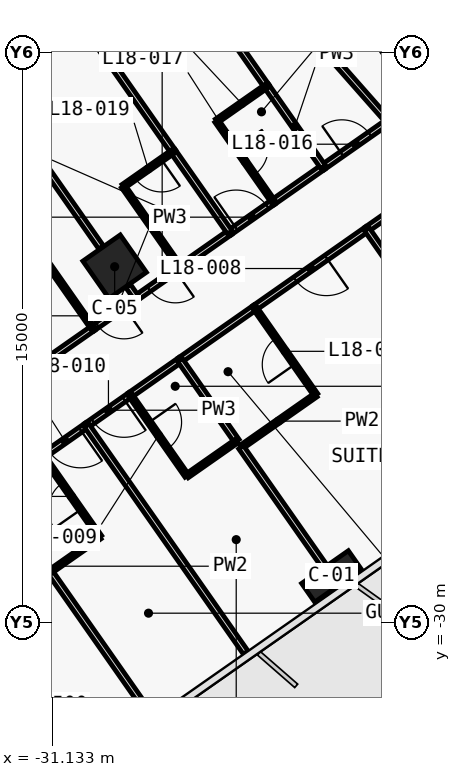
"""IFC4 building model, lengths in metres.
Left out: names, types, materials, properties, quantities, classifications, styles, units other than length and angle.
Written with IfcOpenShell. Run it as: python <this file> out.ifc"""

import sys

from ifc_helpers import new_model, si_unit, direction, frame, frame_2d, origin, origin_2d, place, context, subcontext, project, spatial, polyline, rectangle, outline, extrude, element, fill, save


model = new_model("IFC4")
c1 = context("Model", 3, precision=1e-05, world=origin(), true_north=direction((0.0, 1.0)))
c2 = subcontext(c1, "Body", "Model", "MODEL_VIEW")
j1 = project(units=[si_unit("LENGTHUNIT", "METRE"), si_unit("PLANEANGLEUNIT", "RADIAN")], contexts=[c1])
p1 = place(None, origin())
s1 = spatial("IfcSite", under=j1, at=p1, CompositionType="ELEMENT")
p2 = place(p1, origin())
s2 = spatial("IfcBuilding", under=s1, at=p2, CompositionType="ELEMENT")
p3 = place(p2, frame((0.0, 0.0, 90.5)))
s3 = spatial("IfcBuildingStorey", under=s2, at=p3, CompositionType="ELEMENT", Elevation=90.5)
p4 = place(p3, frame((-21.708, -15.2, 0.0), z_axis=(0.0, 0.0, 1.0), x_axis=(-0.573576324356, 0.819152122709, 0.0)))
e1 = element("IfcWall", 1, at=p4, inside=s3, PredefinedType="SHEAR", context=c2, shape_type="SweptSolid", body=[
    extrude(outline(polyline([(0.0, 0.5), (0.0, -0.5), (9.2, -0.5), (9.2, 0.5), (0.0, 0.5)])), origin(), (0.0, 0.0, 1.0), 3.6),
])
p5 = place(p4, frame((6.1, 0.0, 0.0)))
e2 = element("IfcOpeningElement", 2, at=p5, cuts=e1, PredefinedType="OPENING", context=c2, shape_type="SweptSolid", body=[
    extrude(rectangle(XDim=1.8, YDim=2.1, at=frame_2d((0.9, 1.05))), frame((0.0, 0.51, 0.0), z_axis=(0.0, -1.0, 0.0), x_axis=(1.0, 0.0, 0.0)), (0.0, 0.0, 1.0), 1.02),
])
p6 = place(p4, frame((1.9, 0.0, 0.0)))
e3 = element("IfcOpeningElement", 3, at=p6, cuts=e1, PredefinedType="OPENING", context=c2, shape_type="SweptSolid", body=[
    extrude(rectangle(XDim=1.8, YDim=2.1, at=frame_2d((0.9, 1.05))), frame((0.0, 0.51, 0.0), z_axis=(0.0, -1.0, 0.0), x_axis=(1.0, 0.0, 0.0)), (0.0, 0.0, 1.0), 1.02),
])
p7 = place(p3, frame((-23.782, -28.799, 0.0), z_axis=(0.0, 0.0, 1.0), x_axis=(-0.819152044289, -0.573576436351, 0.0)))
e4 = element("IfcColumn", 4, at=p7, inside=s3, PredefinedType="COLUMN", context=c2, shape_type="SweptSolid", body=[
    extrude(rectangle(XDim=1.5, YDim=0.6, at=origin_2d()), origin(), (0.0, 0.0, 1.0), 3.6),
])
p8 = place(p3, frame((-29.49, -20.649, 0.0), z_axis=(0.0, 0.0, 1.0), x_axis=(-0.819152044289, -0.573576436351, 0.0)))
e5 = element("IfcColumn", 5, at=p8, inside=s3, PredefinedType="COLUMN", context=c2, shape_type="SweptSolid", body=[
    extrude(rectangle(XDim=1.2, YDim=1.2, at=origin_2d()), origin(), (0.0, 0.0, 1.0), 3.6),
])
p9 = place(p3, frame((-24.003, -18.028, 0.0), z_axis=(0.0, 0.0, 1.0), x_axis=(0.819160859995, 0.573563846013, 0.0)))
e6 = element("IfcWall", 6, at=p9, inside=s3, PredefinedType="PARTITIONING", context=c2, shape_type="SweptSolid", body=[
    extrude(rectangle(XDim=2.098, YDim=0.15, at=frame_2d((1.049, 0.0))), origin(), (0.0, 0.0, 1.0), 3.32),
])
p10 = place(p9, frame((0.599, 0.0, 0.0)))
e7 = element("IfcOpeningElement", 7, at=p10, cuts=e6, PredefinedType="OPENING", context=c2, shape_type="SweptSolid", body=[
    extrude(rectangle(XDim=0.9, YDim=2.1, at=frame_2d((0.45, 1.05))), frame((0.0, 0.085, 0.0), z_axis=(0.0, -1.0, 0.0), x_axis=(1.0, 0.0, 0.0)), (0.0, 0.0, 1.0), 0.17),
])
p11 = place(p3, frame((-26.46, -19.748, 0.0), z_axis=(0.0, 0.0, 1.0), x_axis=(0.819199220913, 0.573509055252, 0.0)))
e8 = element("IfcWall", 8, at=p11, inside=s3, PredefinedType="PARTITIONING", context=c2, shape_type="SweptSolid", body=[
    extrude(rectangle(XDim=1.403, YDim=0.15, at=frame_2d((0.702, 0.0))), origin(), (0.0, 0.0, 1.0), 3.32),
])
p12 = place(p11, frame((0.202, 0.0, 0.0)))
e9 = element("IfcOpeningElement", 9, at=p12, cuts=e8, PredefinedType="OPENING", context=c2, shape_type="SweptSolid", body=[
    extrude(rectangle(XDim=1.0, YDim=2.1, at=frame_2d((0.5, 1.05))), frame((0.0, 0.085, 0.0), z_axis=(0.0, -1.0, 0.0), x_axis=(1.0, 0.0, 0.0)), (0.0, 0.0, 1.0), 0.17),
])
p13 = place(p3, frame((-25.313, -18.945, 0.0), z_axis=(0.0, 0.0, 1.0), x_axis=(0.819189013667, 0.573523634986, 0.0)))
e10 = element("IfcWall", 10, at=p13, inside=s3, PredefinedType="PARTITIONING", context=c2, shape_type="SweptSolid", body=[
    extrude(rectangle(XDim=1.604, YDim=0.15, at=frame_2d((0.802, 0.0))), origin(), (0.0, 0.0, 1.0), 3.32),
])
p14 = place(p3, frame((-27.768, -20.664, 0.0), z_axis=(0.0, 0.0, 1.0), x_axis=(-0.81914197737, -0.573590813132, 0.0)))
e11 = element("IfcWall", 11, at=p14, inside=s3, PredefinedType="PARTITIONING", context=c2, shape_type="SweptSolid", body=[
    extrude(rectangle(XDim=1.403, YDim=0.15, at=frame_2d((0.701, 0.0))), origin(), (0.0, 0.0, 1.0), 2.6),
])
p15 = place(p14, frame((0.15, 0.0, 0.0)))
e12 = element("IfcOpeningElement", 12, at=p15, cuts=e11, PredefinedType="OPENING", context=c2, shape_type="SweptSolid", body=[
    extrude(rectangle(XDim=0.85, YDim=2.1, at=frame_2d((0.425, 1.05))), frame((0.0, 0.085, 0.0), z_axis=(0.0, -1.0, 0.0), x_axis=(1.0, 0.0, 0.0)), (0.0, 0.0, 1.0), 0.17),
])
p16 = place(p3, frame((-27.771, -20.666, 0.0), z_axis=(0.0, 0.0, 1.0), x_axis=(0.819189013667, 0.573523634986, 0.0)))
e13 = element("IfcWall", 13, at=p16, inside=s3, PredefinedType="PARTITIONING", context=c2, shape_type="SweptSolid", body=[
    extrude(rectangle(XDim=1.604, YDim=0.15, at=frame_2d((0.802, 0.0))), origin(), (0.0, 0.0, 1.0), 3.32),
])
p17 = place(p3, frame((-28.914, -21.467, 0.0), z_axis=(0.0, 0.0, 1.0), x_axis=(-0.81914197737, -0.573590813132, 0.0)))
e14 = element("IfcWall", 14, at=p17, inside=s3, PredefinedType="PARTITIONING", context=c2, shape_type="SweptSolid", body=[
    extrude(rectangle(XDim=1.403, YDim=0.15, at=frame_2d((0.701, 0.0))), origin(), (0.0, 0.0, 1.0), 2.6),
])
p18 = place(p17, frame((0.403, 0.0, 0.0)))
e15 = element("IfcOpeningElement", 15, at=p18, cuts=e14, PredefinedType="OPENING", context=c2, shape_type="SweptSolid", body=[
    extrude(rectangle(XDim=0.85, YDim=2.1, at=frame_2d((0.425, 1.05))), frame((0.0, 0.085, 0.0), z_axis=(0.0, -1.0, 0.0), x_axis=(1.0, 0.0, 0.0)), (0.0, 0.0, 1.0), 0.17),
])
p19 = place(p3, frame((-31.375, -23.19, 0.0), z_axis=(0.0, 0.0, 1.0), x_axis=(0.819189013667, 0.573523634986, 0.0)))
e16 = element("IfcWall", 16, at=p19, inside=s3, PredefinedType="PARTITIONING", context=c2, shape_type="SweptSolid", body=[
    extrude(rectangle(XDim=1.604, YDim=0.15, at=frame_2d((0.802, 0.0))), origin(), (0.0, 0.0, 1.0), 3.32),
])
p20 = place(p3, frame((-20.395, -17.943, 0.0), z_axis=(0.0, 0.0, 1.0), x_axis=(-0.819128818764, -0.573609604409, 0.0)))
e17 = element("IfcWall", 17, at=p20, inside=s3, PredefinedType="PARTITIONING", context=c2, shape_type="SweptSolid", body=[
    extrude(rectangle(XDim=3.004, YDim=0.15, at=frame_2d((1.502, 0.0))), origin(), (0.0, 0.0, 1.0), 2.6),
])
p21 = place(p20, frame((1.052, 0.0, 0.0)))
e18 = element("IfcOpeningElement", 18, at=p21, cuts=e17, PredefinedType="OPENING", context=c2, shape_type="SweptSolid", body=[
    extrude(rectangle(XDim=0.9, YDim=2.1, at=frame_2d((0.45, 1.05))), frame((0.0, 0.085, 0.0), z_axis=(0.0, -1.0, 0.0), x_axis=(1.0, 0.0, 0.0)), (0.0, 0.0, 1.0), 0.17),
])
p22 = place(p3, frame((-22.852, -19.664, 0.0), z_axis=(0.0, 0.0, 1.0), x_axis=(-0.819145961204, -0.573585123798, 0.0)))
e19 = element("IfcWall", 19, at=p22, inside=s3, PredefinedType="PARTITIONING", context=c2, shape_type="SweptSolid", body=[
    extrude(rectangle(XDim=3.603, YDim=0.15, at=frame_2d((1.802, 0.0))), origin(), (0.0, 0.0, 1.0), 3.32),
])
p23 = place(p22, frame((1.302, 0.0, 0.0)))
e20 = element("IfcOpeningElement", 20, at=p23, cuts=e19, PredefinedType="OPENING", context=c2, shape_type="SweptSolid", body=[
    extrude(rectangle(XDim=1.0, YDim=2.1, at=frame_2d((0.5, 1.05))), frame((0.0, 0.085, 0.0), z_axis=(0.0, -1.0, 0.0), x_axis=(1.0, 0.0, 0.0)), (0.0, 0.0, 1.0), 0.17),
])
p24 = place(p3, frame((-25.801, -21.729, 0.0), z_axis=(0.0, 0.0, 1.0), x_axis=(-0.819179439794, -0.573537309527, 0.0)))
e21 = element("IfcWall", 21, at=p24, inside=s3, PredefinedType="PARTITIONING", context=c2, shape_type="SweptSolid", body=[
    extrude(rectangle(XDim=2.404, YDim=0.15, at=frame_2d((1.202, 0.0))), origin(), (0.0, 0.0, 1.0), 2.6),
])
p25 = place(p3, frame((-29.079, -24.023, 0.0), z_axis=(0.0, 0.0, 1.0), x_axis=(-0.81914197737, -0.573590813132, 0.0)))
e22 = element("IfcWall", 22, at=p25, inside=s3, PredefinedType="PARTITIONING", context=c2, shape_type="SweptSolid", body=[
    extrude(rectangle(XDim=1.403, YDim=0.15, at=frame_2d((0.701, 0.0))), origin(), (0.0, 0.0, 1.0), 3.32),
])
p26 = place(p25, frame((0.201, 0.0, 0.0)))
e23 = element("IfcOpeningElement", 23, at=p26, cuts=e22, PredefinedType="OPENING", context=c2, shape_type="SweptSolid", body=[
    extrude(rectangle(XDim=1.0, YDim=2.1, at=frame_2d((0.5, 1.05))), frame((0.0, 0.085, 0.0), z_axis=(0.0, -1.0, 0.0), x_axis=(1.0, 0.0, 0.0)), (0.0, 0.0, 1.0), 0.17),
])
p27 = place(p3, frame((-27.767, -23.105, 0.0), z_axis=(0.0, 0.0, 1.0), x_axis=(-0.819117502046, -0.573625764625, 0.0)))
e24 = element("IfcWall", 24, at=p27, inside=s3, PredefinedType="PARTITIONING", context=c2, shape_type="SweptSolid", body=[
    extrude(rectangle(XDim=1.604, YDim=0.15, at=frame_2d((0.802, 0.0))), origin(), (0.0, 0.0, 1.0), 2.6),
])
p28 = place(p3, frame((-30.225, -24.826, 0.0), z_axis=(0.0, 0.0, 1.0), x_axis=(-0.819060210533, -0.573707566205, 0.0)))
e25 = element("IfcWall", 25, at=p28, inside=s3, PredefinedType="PARTITIONING", context=c2, shape_type="SweptSolid", body=[
    extrude(rectangle(XDim=1.403, YDim=0.15, at=frame_2d((0.702, 0.0))), origin(), (0.0, 0.0, 1.0), 3.32),
])
p29 = place(p28, frame((0.202, 0.0, 0.0)))
e26 = element("IfcOpeningElement", 26, at=p29, cuts=e25, PredefinedType="OPENING", context=c2, shape_type="SweptSolid", body=[
    extrude(rectangle(XDim=1.0, YDim=2.1, at=frame_2d((0.5, 1.05))), frame((0.0, 0.085, 0.0), z_axis=(0.0, -1.0, 0.0), x_axis=(1.0, 0.0, 0.0)), (0.0, 0.0, 1.0), 0.17),
])
p30 = place(p3, frame((-22.284, -16.827, 0.0), z_axis=(0.0, 0.0, 1.0), x_axis=(-0.661545117561, 0.749905365651, 0.0)))
e27 = element("IfcWall", 27, at=p30, inside=s3, PredefinedType="PARTITIONING", context=c2, shape_type="SweptSolid", body=[
    extrude(rectangle(XDim=6.543, YDim=0.15, at=frame_2d((3.271, 0.0))), origin(), (0.0, 0.0, 1.0), 2.6),
])
p31 = place(p3, frame((-25.492, -15.897, 0.0), z_axis=(0.0, 0.0, 1.0), x_axis=(-0.573579093502, 0.819150183725, 0.0)))
e28 = element("IfcWall", 28, at=p31, inside=s3, PredefinedType="PARTITIONING", context=c2, shape_type="SweptSolid", body=[
    extrude(rectangle(XDim=8.701, YDim=0.15, at=frame_2d((4.351, 0.0))), origin(), (0.0, 0.0, 1.0), 2.6),
])
p32 = place(p3, frame((-24.001, -18.026, 0.0), z_axis=(0.0, 0.0, 1.0), x_axis=(-0.573588285102, 0.819143747577, 0.0)))
e29 = element("IfcWall", 29, at=p32, inside=s3, PredefinedType="PARTITIONING", context=c2, shape_type="SweptSolid", body=[
    extrude(rectangle(XDim=2.602, YDim=0.15, at=frame_2d((1.301, 0.0))), origin(), (0.0, 0.0, 1.0), 2.6),
])
p33 = place(p3, frame((-25.493, -15.896, 0.0), z_axis=(0.0, 0.0, 1.0), x_axis=(-0.819059844958, -0.573708088123, 0.0)))
e30 = element("IfcWall", 30, at=p33, inside=s3, PredefinedType="PARTITIONING", context=c2, shape_type="SweptSolid", body=[
    extrude(rectangle(XDim=1.6, YDim=0.12, at=frame_2d((0.8, 0.0))), origin(), (0.0, 0.0, 1.0), 3.32),
])
p34 = place(p3, frame((-26.804, -16.815, 0.0), z_axis=(0.0, 0.0, 1.0), x_axis=(0.573582085028, -0.819148089014, 0.0)))
e31 = element("IfcWall", 31, at=p34, inside=s3, PredefinedType="PARTITIONING", context=c2, shape_type="SweptSolid", body=[
    extrude(rectangle(XDim=2.6, YDim=0.12, at=frame_2d((1.3, 0.0))), origin(), (0.0, 0.0, 1.0), 2.6),
])
p35 = place(p34, frame((0.875, 0.0, 0.0)))
e32 = element("IfcOpeningElement", 32, at=p35, cuts=e31, PredefinedType="OPENING", context=c2, shape_type="SweptSolid", body=[
    extrude(rectangle(XDim=0.85, YDim=2.05, at=frame_2d((0.425, 1.025))), frame((0.0, 0.07, 0.0), z_axis=(0.0, -1.0, 0.0), x_axis=(1.0, 0.0, 0.0)), (0.0, 0.0, 1.0), 0.14),
])
p36 = place(p3, frame((-27.949, -17.618, 0.0), z_axis=(0.0, 0.0, 1.0), x_axis=(-0.573579093502, 0.819150183725, 0.0)))
e33 = element("IfcWall", 33, at=p36, inside=s3, PredefinedType="PARTITIONING", context=c2, shape_type="SweptSolid", body=[
    extrude(rectangle(XDim=8.701, YDim=0.15, at=frame_2d((4.351, 0.0))), origin(), (0.0, 0.0, 1.0), 2.6),
])
p37 = place(p3, frame((-26.458, -19.747, 0.0), z_axis=(0.0, 0.0, 1.0), x_axis=(-0.573544201094, 0.819174614714, 0.0)))
e34 = element("IfcWall", 34, at=p37, inside=s3, PredefinedType="PARTITIONING", context=c2, shape_type="SweptSolid", body=[
    extrude(rectangle(XDim=2.602, YDim=0.15, at=frame_2d((1.301, 0.0))), origin(), (0.0, 0.0, 1.0), 2.6),
])
p38 = place(p3, frame((-27.95, -17.617, 0.0), z_axis=(0.0, 0.0, 1.0), x_axis=(-0.819253425856, -0.573431621227, 0.0)))
e35 = element("IfcWall", 35, at=p38, inside=s3, PredefinedType="PARTITIONING", context=c2, shape_type="SweptSolid", body=[
    extrude(rectangle(XDim=1.6, YDim=0.12, at=frame_2d((0.8, 0.0))), origin(), (0.0, 0.0, 1.0), 3.32),
])
p39 = place(p38, frame((0.375, 0.0, 0.0)))
e36 = element("IfcOpeningElement", 36, at=p39, cuts=e35, PredefinedType="OPENING", context=c2, shape_type="SweptSolid", body=[
    extrude(rectangle(XDim=0.85, YDim=2.05, at=frame_2d((0.425, 1.025))), frame((0.0, 0.07, 0.0), z_axis=(0.0, -1.0, 0.0), x_axis=(1.0, 0.0, 0.0)), (0.0, 0.0, 1.0), 0.14),
])
p40 = place(p3, frame((-29.261, -18.536, 0.0), z_axis=(0.0, 0.0, 1.0), x_axis=(0.573537965655, -0.819178980414, 0.0)))
e37 = element("IfcWall", 37, at=p40, inside=s3, PredefinedType="PARTITIONING", context=c2, shape_type="SweptSolid", body=[
    extrude(rectangle(XDim=2.6, YDim=0.12, at=frame_2d((1.3, 0.0))), origin(), (0.0, 0.0, 1.0), 2.6),
])
p41 = place(p3, frame((-28.916, -21.468, 0.0), z_axis=(0.0, 0.0, 1.0), x_axis=(-0.572944929411, 0.819593867633, 0.0)))
e38 = element("IfcWall", 38, at=p41, inside=s3, PredefinedType="PARTITIONING", context=c2, shape_type="SweptSolid", body=[
    extrude(rectangle(XDim=0.38, YDim=0.15, at=frame_2d((0.19, 0.0))), origin(), (0.0, 0.0, 1.0), 2.6),
])
p42 = place(p3, frame((-29.845, -20.141, 0.0), z_axis=(0.0, 0.0, 1.0), x_axis=(-0.573558725113, 0.819164445546, 0.0)))
e39 = element("IfcWall", 39, at=p42, inside=s3, PredefinedType="PARTITIONING", context=c2, shape_type="SweptSolid", body=[
    extrude(rectangle(XDim=9.01, YDim=0.15, at=frame_2d((4.505, 0.0))), origin(), (0.0, 0.0, 1.0), 2.6),
])
p43 = place(p3, frame((-30.062, -22.27, 0.0), z_axis=(0.0, 0.0, 1.0), x_axis=(-0.573537965655, 0.819178980414, 0.0)))
e40 = element("IfcWall", 40, at=p43, inside=s3, PredefinedType="PARTITIONING", context=c2, shape_type="SweptSolid", body=[
    extrude(rectangle(XDim=2.6, YDim=0.12, at=frame_2d((1.3, 0.0))), origin(), (0.0, 0.0, 1.0), 2.6),
])
p44 = place(p3, frame((-18.667, -25.645, 0.0), z_axis=(0.0, 0.0, 1.0), x_axis=(-0.573572324301, 0.819154923562, 0.0)))
e41 = element("IfcWall", 41, at=p44, inside=s3, PredefinedType="PARTITIONING", context=c2, shape_type="SweptSolid", body=[
    extrude(rectangle(XDim=7.3, YDim=0.15, at=frame_2d((3.65, 0.0))), origin(), (0.0, 0.0, 1.0), 2.5),
])
p45 = place(p3, frame((-26.162, -25.401, 0.0), z_axis=(0.0, 0.0, 1.0), x_axis=(0.819155442668, 0.573571582932, 0.0)))
e42 = element("IfcWall", 42, at=p45, inside=s3, PredefinedType="PARTITIONING", context=c2, shape_type="SweptSolid", body=[
    extrude(rectangle(XDim=2.4, YDim=0.12, at=frame_2d((1.2, 0.0))), origin(), (0.0, 0.0, 1.0), 2.6),
])
p46 = place(p3, frame((-24.196, -24.023, 0.0), z_axis=(0.0, 0.0, 1.0), x_axis=(-0.573608623498, 0.819129505664, 0.0)))
e43 = element("IfcWall", 43, at=p46, inside=s3, PredefinedType="PARTITIONING", context=c2, shape_type="SweptSolid", body=[
    extrude(rectangle(XDim=2.8, YDim=0.12, at=frame_2d((1.4, 0.0))), origin(), (0.0, 0.0, 1.0), 3.32),
])
p47 = place(p46, frame((0.975, 0.0, 0.0)))
e44 = element("IfcOpeningElement", 44, at=p47, cuts=e43, PredefinedType="OPENING", context=c2, shape_type="SweptSolid", body=[
    extrude(rectangle(XDim=0.85, YDim=2.05, at=frame_2d((0.425, 1.025))), frame((0.0, 0.07, 0.0), z_axis=(0.0, -1.0, 0.0), x_axis=(1.0, 0.0, 0.0)), (0.0, 0.0, 1.0), 0.14),
])
p48 = place(p3, frame((-23.966, -28.537, 0.0), z_axis=(0.0, 0.0, 1.0), x_axis=(-0.573594994199, 0.819139049631, 0.0)))
e45 = element("IfcWall", 45, at=p48, inside=s3, PredefinedType="PARTITIONING", context=c2, shape_type="SweptSolid", body=[
    extrude(rectangle(XDim=3.829, YDim=0.15, at=frame_2d((1.915, 0.0))), origin(), (0.0, 0.0, 1.0), 2.6),
])
p49 = place(p3, frame((-26.276, -25.238, 0.0), z_axis=(0.0, 0.0, 1.0), x_axis=(-0.573588285102, 0.819143747577, 0.0)))
e46 = element("IfcWall", 46, at=p49, inside=s3, PredefinedType="PARTITIONING", context=c2, shape_type="SweptSolid", body=[
    extrude(rectangle(XDim=2.602, YDim=0.15, at=frame_2d((1.301, 0.0))), origin(), (0.0, 0.0, 1.0), 2.6),
])
p50 = place(p3, frame((-29.08, -24.024, 0.0), z_axis=(0.0, 0.0, 1.0), x_axis=(0.573537965655, -0.819178980414, 0.0)))
e47 = element("IfcWall", 47, at=p50, inside=s3, PredefinedType="PARTITIONING", context=c2, shape_type="SweptSolid", body=[
    extrude(rectangle(XDim=2.6, YDim=0.12, at=frame_2d((1.3, 0.0))), origin(), (0.0, 0.0, 1.0), 3.32),
])
p51 = place(p50, frame((0.875, 0.0, 0.0)))
e48 = element("IfcOpeningElement", 48, at=p51, cuts=e47, PredefinedType="OPENING", context=c2, shape_type="SweptSolid", body=[
    extrude(rectangle(XDim=0.85, YDim=2.05, at=frame_2d((0.425, 1.025))), frame((0.0, 0.07, 0.0), z_axis=(0.0, -1.0, 0.0), x_axis=(1.0, 0.0, 0.0)), (0.0, 0.0, 1.0), 0.14),
])
p52 = place(p3, frame((-27.587, -26.155, 0.0), z_axis=(0.0, 0.0, 1.0), x_axis=(0.819131543282, 0.57360571371, 0.0)))
e49 = element("IfcWall", 49, at=p52, inside=s3, PredefinedType="PARTITIONING", context=c2, shape_type="SweptSolid", body=[
    extrude(rectangle(XDim=1.6, YDim=0.12, at=frame_2d((0.8, 0.0))), origin(), (0.0, 0.0, 1.0), 2.6),
])
p53 = place(p3, frame((-26.039, -30.807, 0.0), z_axis=(0.0, 0.0, 1.0), x_axis=(-0.573594765376, 0.819139209862, 0.0)))
e50 = element("IfcWall", 50, at=p53, inside=s3, PredefinedType="PARTITIONING", context=c2, shape_type="SweptSolid", body=[
    extrude(rectangle(XDim=7.3, YDim=0.15, at=frame_2d((3.65, 0.0))), origin(), (0.0, 0.0, 1.0), 2.5),
])
p54 = place(p3, frame((-31.192, -28.678, 0.0), z_axis=(0.0, 0.0, 1.0), x_axis=(0.81918174131, 0.573534022273, 0.0)))
e51 = element("IfcWall", 51, at=p54, inside=s3, PredefinedType="PARTITIONING", context=c2, shape_type="SweptSolid", body=[
    extrude(rectangle(XDim=1.6, YDim=0.12, at=frame_2d((0.8, 0.0))), origin(), (0.0, 0.0, 1.0), 3.32),
])
p55 = place(p3, frame((-29.881, -27.759, 0.0), z_axis=(0.0, 0.0, 1.0), x_axis=(-0.573600972199, 0.819134863556, 0.0)))
e52 = element("IfcWall", 52, at=p55, inside=s3, PredefinedType="PARTITIONING", context=c2, shape_type="SweptSolid", body=[
    extrude(rectangle(XDim=2.6, YDim=0.12, at=frame_2d((1.3, 0.0))), origin(), (0.0, 0.0, 1.0), 3.32),
])
p56 = place(p55, frame((0.875, 0.0, 0.0)))
e53 = element("IfcOpeningElement", 53, at=p56, cuts=e52, PredefinedType="OPENING", context=c2, shape_type="SweptSolid", body=[
    extrude(rectangle(XDim=0.85, YDim=2.05, at=frame_2d((0.425, 1.025))), frame((0.0, 0.07, 0.0), z_axis=(0.0, -1.0, 0.0), x_axis=(1.0, 0.0, 0.0)), (0.0, 0.0, 1.0), 0.14),
])
p57 = place(p3, frame((-28.497, -32.528, 0.0), z_axis=(0.0, 0.0, 1.0), x_axis=(-0.573570431261, 0.819156249066, 0.0)))
e54 = element("IfcWall", 54, at=p57, inside=s3, PredefinedType="PARTITIONING", context=c2, shape_type="SweptSolid", body=[
    extrude(rectangle(XDim=4.699, YDim=0.15, at=frame_2d((2.35, 0.0))), origin(), (0.0, 0.0, 1.0), 2.5),
])
p58 = place(p47, origin())
e55 = element("IfcDoor", 55, at=p58, inside=s3, OperationType="SINGLE_SWING_LEFT", PredefinedType="DOOR", context=c2, shape_type="SweptSolid", body=[
    extrude(rectangle(XDim=0.85, YDim=2.05, at=frame_2d((0.425, 1.025))), frame((0.0, 0.025, 0.0), z_axis=(0.0, -1.0, 0.0), x_axis=(1.0, 0.0, 0.0)), (0.0, 0.0, 1.0), 0.05),
])
fill(e44, e55)
p59 = place(p23, origin())
e56 = element("IfcDoor", 56, at=p59, inside=s3, OperationType="SINGLE_SWING_RIGHT", PredefinedType="DOOR", context=c2, shape_type="SweptSolid", body=[
    extrude(rectangle(XDim=1.0, YDim=2.1, at=frame_2d((0.5, 1.05))), frame((0.0, 0.025, 0.0), z_axis=(0.0, -1.0, 0.0), x_axis=(1.0, 0.0, 0.0)), (0.0, 0.0, 1.0), 0.05),
])
fill(e20, e56)
p60 = place(p51, origin())
e57 = element("IfcDoor", 57, at=p60, inside=s3, OperationType="SINGLE_SWING_RIGHT", PredefinedType="DOOR", context=c2, shape_type="SweptSolid", body=[
    extrude(rectangle(XDim=0.85, YDim=2.05, at=frame_2d((0.425, 1.025))), frame((0.0, 0.025, 0.0), z_axis=(0.0, -1.0, 0.0), x_axis=(1.0, 0.0, 0.0)), (0.0, 0.0, 1.0), 0.05),
])
fill(e48, e57)
p61 = place(p26, origin())
e58 = element("IfcDoor", 58, at=p61, inside=s3, OperationType="SINGLE_SWING_LEFT", PredefinedType="DOOR", context=c2, shape_type="SweptSolid", body=[
    extrude(rectangle(XDim=1.0, YDim=2.1, at=frame_2d((0.5, 1.05))), frame((0.0, 0.025, 0.0), z_axis=(0.0, -1.0, 0.0), x_axis=(1.0, 0.0, 0.0)), (0.0, 0.0, 1.0), 0.05),
])
fill(e23, e58)
p62 = place(p56, origin())
e59 = element("IfcDoor", 59, at=p62, inside=s3, OperationType="SINGLE_SWING_RIGHT", PredefinedType="DOOR", context=c2, shape_type="SweptSolid", body=[
    extrude(rectangle(XDim=0.85, YDim=2.05, at=frame_2d((0.425, 1.025))), frame((0.0, 0.025, 0.0), z_axis=(0.0, -1.0, 0.0), x_axis=(1.0, 0.0, 0.0)), (0.0, 0.0, 1.0), 0.05),
])
fill(e53, e59)
p63 = place(p29, origin())
e60 = element("IfcDoor", 60, at=p63, inside=s3, OperationType="SINGLE_SWING_LEFT", PredefinedType="DOOR", context=c2, shape_type="SweptSolid", body=[
    extrude(rectangle(XDim=1.0, YDim=2.1, at=frame_2d((0.5, 1.05))), frame((0.0, 0.025, 0.0), z_axis=(0.0, -1.0, 0.0), x_axis=(1.0, 0.0, 0.0)), (0.0, 0.0, 1.0), 0.05),
])
fill(e26, e60)
p64 = place(p10, origin())
e61 = element("IfcDoor", 61, at=p64, inside=s3, OperationType="SINGLE_SWING_RIGHT", PredefinedType="DOOR", context=c2, shape_type="SweptSolid", body=[
    extrude(rectangle(XDim=0.9, YDim=2.1, at=frame_2d((0.45, 1.05))), frame((0.0, 0.025, 0.0), z_axis=(0.0, -1.0, 0.0), x_axis=(1.0, 0.0, 0.0)), (0.0, 0.0, 1.0), 0.05),
])
fill(e7, e61)
p65 = place(p35, origin())
e62 = element("IfcDoor", 62, at=p65, inside=s3, OperationType="SINGLE_SWING_RIGHT", PredefinedType="DOOR", context=c2, shape_type="SweptSolid", body=[
    extrude(rectangle(XDim=0.85, YDim=2.05, at=frame_2d((0.425, 1.025))), frame((0.0, 0.025, 0.0), z_axis=(0.0, -1.0, 0.0), x_axis=(1.0, 0.0, 0.0)), (0.0, 0.0, 1.0), 0.05),
])
fill(e32, e62)
p66 = place(p12, origin())
e63 = element("IfcDoor", 63, at=p66, inside=s3, OperationType="SINGLE_SWING_LEFT", PredefinedType="DOOR", context=c2, shape_type="SweptSolid", body=[
    extrude(rectangle(XDim=1.0, YDim=2.1, at=frame_2d((0.5, 1.05))), frame((0.0, 0.025, 0.0), z_axis=(0.0, -1.0, 0.0), x_axis=(1.0, 0.0, 0.0)), (0.0, 0.0, 1.0), 0.05),
])
fill(e9, e63)
p67 = place(p39, origin())
e64 = element("IfcDoor", 64, at=p67, inside=s3, OperationType="SINGLE_SWING_LEFT", PredefinedType="DOOR", context=c2, shape_type="SweptSolid", body=[
    extrude(rectangle(XDim=0.85, YDim=2.05, at=frame_2d((0.425, 1.025))), frame((0.0, 0.025, 0.0), z_axis=(0.0, -1.0, 0.0), x_axis=(1.0, 0.0, 0.0)), (0.0, 0.0, 1.0), 0.05),
])
fill(e36, e64)
p68 = place(p15, origin())
e65 = element("IfcDoor", 65, at=p68, inside=s3, OperationType="SINGLE_SWING_LEFT", PredefinedType="DOOR", context=c2, shape_type="SweptSolid", body=[
    extrude(rectangle(XDim=0.85, YDim=2.1, at=frame_2d((0.425, 1.05))), frame((0.0, 0.025, 0.0), z_axis=(0.0, -1.0, 0.0), x_axis=(1.0, 0.0, 0.0)), (0.0, 0.0, 1.0), 0.05),
])
fill(e12, e65)
p69 = place(p18, origin())
e66 = element("IfcDoor", 66, at=p69, inside=s3, OperationType="SINGLE_SWING_RIGHT", PredefinedType="DOOR", context=c2, shape_type="SweptSolid", body=[
    extrude(rectangle(XDim=0.85, YDim=2.1, at=frame_2d((0.425, 1.05))), frame((0.0, 0.025, 0.0), z_axis=(0.0, -1.0, 0.0), x_axis=(1.0, 0.0, 0.0)), (0.0, 0.0, 1.0), 0.05),
])
fill(e15, e66)
save(model, sys.argv[1])
